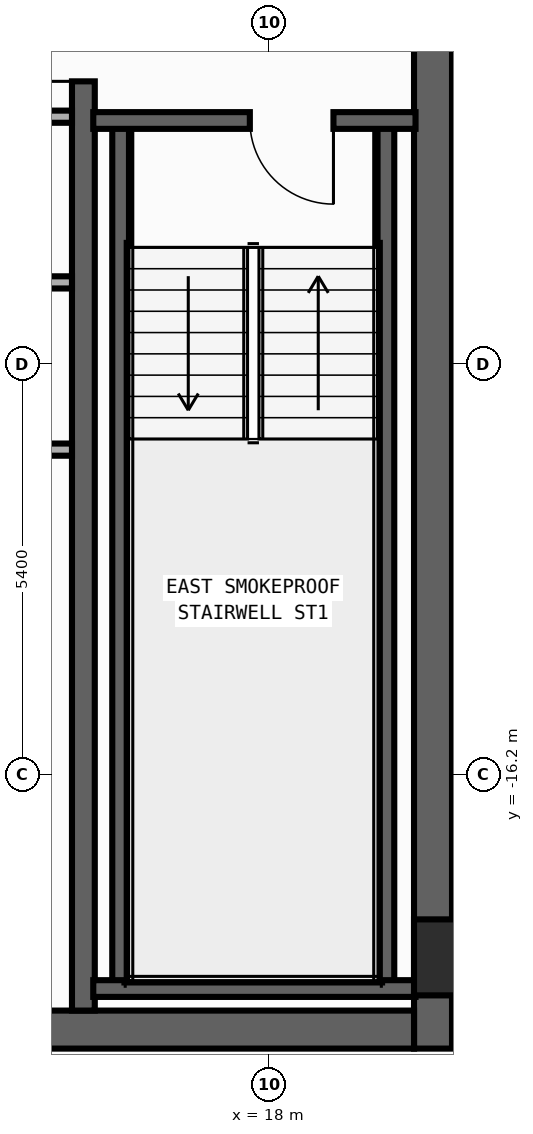
"""IFC4 building model, lengths in metres.
Left out: names, types, materials, properties, quantities, classifications, styles, units other than length and angle.
Written with IfcOpenShell. Run it as: python <this file> out.ifc"""

import sys

from ifc_helpers import new_model, si_unit, direction, frame, frame_2d, origin, origin_2d, place, context, subcontext, project, spatial, rectangle, circle, extrude, element, fill, save


model = new_model("IFC4")
c1 = context("Model", 3, precision=1e-05, world=origin(), true_north=direction((0.0, 1.0)))
c2 = subcontext(c1, "Body", "Model", "MODEL_VIEW")
j1 = project(units=[si_unit("LENGTHUNIT", "METRE"), si_unit("PLANEANGLEUNIT", "RADIAN")], contexts=[c1])
p1 = place(None, origin())
s1 = spatial("IfcSite", under=j1, at=p1, CompositionType="ELEMENT")
p2 = place(p1, origin())
s2 = spatial("IfcBuilding", under=s1, at=p2, CompositionType="ELEMENT")
p3 = place(p2, frame((0.0, 0.0, 277.6)))
s3 = spatial("IfcBuildingStorey", under=s2, at=p3, CompositionType="ELEMENT", Elevation=277.6)
p4 = place(p3, frame((20.15, -19.8, 0.0), z_axis=(0.0, 0.0, 1.0), x_axis=(0.0, 1.0, 0.0)))
e1 = element("IfcWall", 1, at=p4, inside=s3, PredefinedType="SHEAR", context=c2, shape_type="SweptSolid", body=[
    extrude(rectangle(XDim=27.0, YDim=0.5, at=frame_2d((13.5, 0.0))), origin(), (0.0, 0.0, 1.0), 3.54),
])
p5 = place(p3, frame((12.5, -19.55, 0.0), z_axis=(0.0, 0.0, 1.0), x_axis=(1.0, 0.0, 0.0)))
e2 = element("IfcWall", 2, at=p5, inside=s3, PredefinedType="SHEAR", context=c2, shape_type="SweptSolid", body=[
    extrude(rectangle(XDim=7.4, YDim=0.5, at=frame_2d((3.7, 0.0))), origin(), (0.0, 0.0, 1.0), 3.54),
])
p6 = place(p3, frame((15.55, -19.3, 0.0), z_axis=(0.0, 0.0, 1.0), x_axis=(0.0, 1.0, 0.0)))
e3 = element("IfcWall", 3, at=p6, inside=s3, PredefinedType="SHEAR", context=c2, shape_type="SweptSolid", body=[
    extrude(rectangle(XDim=26.0, YDim=0.3, at=frame_2d((13.0, 0.0))), origin(), (0.0, 0.0, 1.0), 3.54),
])
p7 = place(p6, frame((12.225, 0.0, 0.0)))
e4 = element("IfcOpeningElement", 4, at=p7, cuts=e3, PredefinedType="OPENING", context=c2, shape_type="SweptSolid", body=[
    extrude(rectangle(XDim=1.15, YDim=2.2, at=frame_2d((0.575, 1.1))), frame((0.0, 0.16, 0.0), z_axis=(0.0, -1.0, 0.0), x_axis=(1.0, 0.0, 0.0)), (0.0, 0.0, 1.0), 0.32),
])
p8 = place(p6, frame((24.625, 0.0, 0.0)))
e5 = element("IfcOpeningElement", 5, at=p8, cuts=e3, PredefinedType="OPENING", context=c2, shape_type="SweptSolid", body=[
    extrude(rectangle(XDim=0.85, YDim=2.1, at=frame_2d((0.425, 1.05))), frame((0.0, 0.16, 0.0), z_axis=(0.0, -1.0, 0.0), x_axis=(1.0, 0.0, 0.0)), (0.0, 0.0, 1.0), 0.32),
])
for number, where, z_axis, x_axis in (
    (6, (16.04, -19.01, 0.0), (0.0, 0.0, 1.0), (0.0, 1.0, 0.0)),
    (7, (19.53, -19.01, 0.0), (0.0, 0.0, 1.0), (0.0, 1.0, 0.0)),
):
    element("IfcWall", number, at=place(p3, frame(where, z_axis=z_axis, x_axis=x_axis)), inside=s3, PredefinedType="SHEAR", context=c2, shape_type="SweptSolid", body=[
        extrude(rectangle(XDim=11.42, YDim=0.22, at=frame_2d((5.71, 0.0))), origin(), (0.0, 0.0, 1.0), 3.54),
    ])
p9 = place(p3, frame((15.68, -19.01, 0.0), z_axis=(0.0, 0.0, 1.0), x_axis=(1.0, 0.0, 0.0)))
e8 = element("IfcWall", 8, at=p9, inside=s3, PredefinedType="SHEAR", context=c2, shape_type="SweptSolid", body=[
    extrude(rectangle(XDim=4.24, YDim=0.22, at=frame_2d((2.12, 0.0))), origin(), (0.0, 0.0, 1.0), 3.54),
])
p10 = place(p3, frame((19.92, -7.59, 0.0), z_axis=(0.0, 0.0, 1.0), x_axis=(-1.0, 0.0, 0.0)))
e9 = element("IfcWall", 9, at=p10, inside=s3, PredefinedType="SHEAR", context=c2, shape_type="SweptSolid", body=[
    extrude(rectangle(XDim=4.24, YDim=0.22, at=frame_2d((2.12, 0.0))), origin(), (0.0, 0.0, 1.0), 3.54),
])
p11 = place(p10, frame((1.08, 0.0, 0.0)))
e10 = element("IfcOpeningElement", 10, at=p11, cuts=e9, PredefinedType="OPENING", context=c2, shape_type="SweptSolid", body=[
    extrude(rectangle(XDim=1.1, YDim=2.2, at=frame_2d((0.55, 1.1))), frame((0.0, 0.12, 0.0), z_axis=(0.0, -1.0, 0.0), x_axis=(1.0, 0.0, 0.0)), (0.0, 0.0, 1.0), 0.24),
])
p12 = place(p3, frame((20.4, -18.6, 0.0), z_axis=(0.0, 0.0, 1.0), x_axis=(1.0, 0.0, 0.0)))
e11 = element("IfcColumn", 11, at=p12, inside=s3, PredefinedType="COLUMN", context=c2, shape_type="SweptSolid", body=[
    extrude(circle(Radius=0.5, at=origin_2d()), origin(), (0.0, 0.0, 1.0), 3.8),
])
p13 = place(p3, frame((12.8, -7.54, 0.0), z_axis=(0.0, 0.0, 1.0), x_axis=(1.0, 0.0, 0.0)))
e12 = element("IfcWall", 12, at=p13, inside=s3, PredefinedType="STANDARD", context=c2, shape_type="SweptSolid", body=[
    extrude(rectangle(XDim=2.6, YDim=0.16, at=frame_2d((1.3, 0.0))), origin(), (0.0, 0.0, 1.0), 3.54),
])
for number, where, z_axis, x_axis in (
    (13, (12.5, -11.92, 0.0), (0.0, 0.0, 1.0), (1.0, 0.0, 0.0)),
    (14, (12.5, -9.72, 0.0), (0.0, 0.0, 1.0), (1.0, 0.0, 0.0)),
):
    element("IfcWall", number, at=place(p3, frame(where, z_axis=z_axis, x_axis=x_axis)), inside=s3, PredefinedType="PARTITIONING", context=c2, shape_type="SweptSolid", body=[
        extrude(rectangle(XDim=2.9, YDim=0.16, at=frame_2d((1.45, 0.0))), origin(), (0.0, 0.0, 1.0), 3.54),
    ])
p14 = place(p11, origin())
e15 = element("IfcDoor", 15, at=p14, inside=s3, OperationType="SINGLE_SWING_LEFT", PredefinedType="DOOR", context=c2, shape_type="SweptSolid", body=[
    extrude(rectangle(XDim=1.1, YDim=2.2, at=frame_2d((0.55, 1.1))), frame((0.0, 0.025, 0.0), z_axis=(0.0, -1.0, 0.0), x_axis=(1.0, 0.0, 0.0)), (0.0, 0.0, 1.0), 0.05),
])
fill(e10, e15)
p15 = place(p7, origin())
e16 = element("IfcDoor", 16, at=p15, inside=s3, OperationType="SINGLE_SWING_LEFT", PredefinedType="DOOR", context=c2, shape_type="SweptSolid", body=[
    extrude(rectangle(XDim=1.15, YDim=2.2, at=frame_2d((0.575, 1.1))), frame((0.0, 0.025, 0.0), z_axis=(0.0, -1.0, 0.0), x_axis=(1.0, 0.0, 0.0)), (0.0, 0.0, 1.0), 0.05),
])
fill(e4, e16)
save(model, sys.argv[1])
